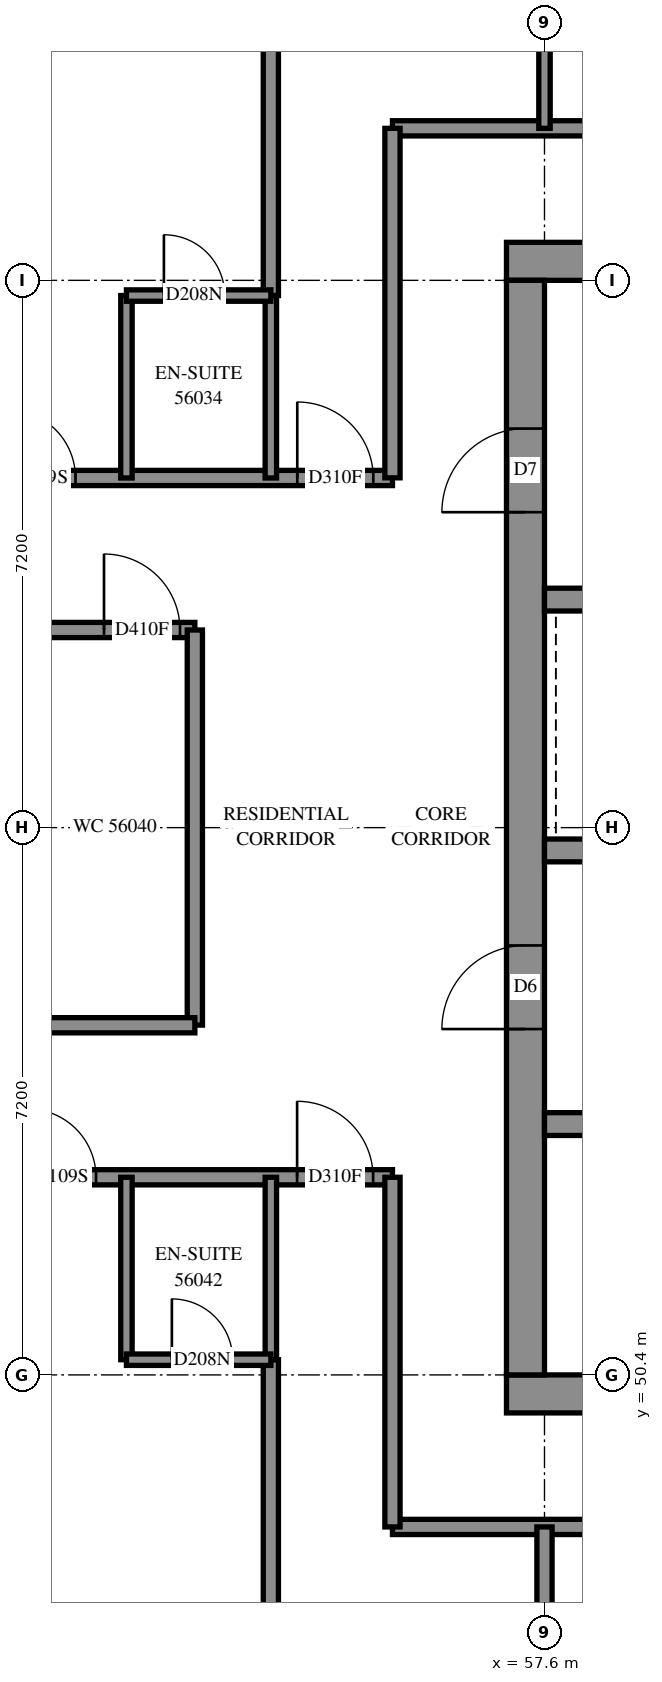
"""IFC4 building model, lengths in metres.
Left out: names, types, materials, properties, quantities, classifications, styles, units other than length and angle.
Written with IfcOpenShell. Run it as: python <this file> out.ifc"""

import sys

from ifc_helpers import new_model, si_unit, direction, frame, frame_2d, origin, place, context, subcontext, project, spatial, rectangle, extrude, element, fill, save


model = new_model("IFC4")
c1 = context("Model", 3, precision=1e-05, world=origin(), true_north=direction((0.0, 1.0)))
c2 = subcontext(c1, "Body", "Model", "MODEL_VIEW")
j1 = project(units=[si_unit("LENGTHUNIT", "METRE"), si_unit("PLANEANGLEUNIT", "RADIAN")], contexts=[c1])
p1 = place(None, origin())
s1 = spatial("IfcSite", under=j1, at=p1, CompositionType="ELEMENT")
p2 = place(p1, origin())
s2 = spatial("IfcBuilding", under=s1, at=p2, CompositionType="ELEMENT")
p3 = place(p2, frame((0.0, 0.0, 206.6)))
s3 = spatial("IfcBuildingStorey", under=s2, at=p3, CompositionType="ELEMENT", Elevation=206.6)
p4 = place(p3, frame((57.1, 50.15, -0.3), z_axis=(0.0, 0.0, 1.0), x_axis=(1.0, 0.0, 0.0)))
e1 = element("IfcWall", 1, at=p4, inside=s3, PredefinedType="SHEAR", context=c2, shape_type="SweptSolid", body=[
    extrude(rectangle(XDim=15.4, YDim=0.5, at=frame_2d((7.7, 0.0))), origin(), (0.0, 0.0, 1.0), 2.7),
])
p5 = place(p3, frame((57.1, 65.05, -0.3), z_axis=(0.0, 0.0, 1.0), x_axis=(1.0, 0.0, 0.0)))
e2 = element("IfcWall", 2, at=p5, inside=s3, PredefinedType="SHEAR", context=c2, shape_type="SweptSolid", body=[
    extrude(rectangle(XDim=15.4, YDim=0.5, at=frame_2d((7.7, 0.0))), origin(), (0.0, 0.0, 1.0), 2.7),
])
p6 = place(p5, frame((10.5, 0.0, 0.3)))
e3 = element("IfcOpeningElement", 3, at=p6, cuts=e2, PredefinedType="OPENING", context=c2, shape_type="SweptSolid", body=[
    extrude(rectangle(XDim=0.8, YDim=2.1, at=frame_2d((0.4, 1.05))), frame((0.0, 0.26, 0.0), z_axis=(0.0, -1.0, 0.0), x_axis=(1.0, 0.0, 0.0)), (0.0, 0.0, 1.0), 0.52),
])
p7 = place(p3, frame((57.35, 50.4, -0.3), z_axis=(0.0, 0.0, 1.0), x_axis=(0.0, 1.0, 0.0)))
e4 = element("IfcWall", 4, at=p7, inside=s3, PredefinedType="SHEAR", context=c2, shape_type="SweptSolid", body=[
    extrude(rectangle(XDim=14.4, YDim=0.5, at=frame_2d((7.2, 0.0))), origin(), (0.0, 0.0, 1.0), 2.7),
])
p8 = place(p7, frame((4.55, 0.0, 0.3)))
e5 = element("IfcOpeningElement", 5, at=p8, cuts=e4, PredefinedType="OPENING", context=c2, shape_type="SweptSolid", body=[
    extrude(rectangle(XDim=1.1, YDim=2.1, at=frame_2d((0.55, 1.05))), frame((0.0, 0.26, 0.0), z_axis=(0.0, -1.0, 0.0), x_axis=(1.0, 0.0, 0.0)), (0.0, 0.0, 1.0), 0.52),
])
p9 = place(p7, frame((11.35, 0.0, 0.3)))
e6 = element("IfcOpeningElement", 6, at=p9, cuts=e4, PredefinedType="OPENING", context=c2, shape_type="SweptSolid", body=[
    extrude(rectangle(XDim=1.1, YDim=2.1, at=frame_2d((0.55, 1.05))), frame((0.0, 0.26, 0.0), z_axis=(0.0, -1.0, 0.0), x_axis=(1.0, 0.0, 0.0)), (0.0, 0.0, 1.0), 0.52),
])
p10 = place(p3, frame((57.6, 53.7, 0.0), z_axis=(0.0, 0.0, 1.0), x_axis=(1.0, 0.0, 0.0)))
e7 = element("IfcWall", 7, at=p10, inside=s3, PredefinedType="SOLIDWALL", context=c2, shape_type="SweptSolid", body=[
    extrude(rectangle(XDim=14.4, YDim=0.3, at=frame_2d((7.2, 0.0))), origin(), (0.0, 0.0, 1.0), 3.1),
])
p11 = place(p10, frame((1.35, 0.0, 0.0)))
e8 = element("IfcOpeningElement", 8, at=p11, cuts=e7, PredefinedType="OPENING", context=c2, shape_type="SweptSolid", body=[
    extrude(rectangle(XDim=0.9, YDim=2.1, at=frame_2d((0.45, 1.05))), frame((0.0, 0.16, 0.0), z_axis=(0.0, -1.0, 0.0), x_axis=(1.0, 0.0, 0.0)), (0.0, 0.0, 1.0), 0.32),
])
p12 = place(p10, frame((4.95, 0.0, 0.0)))
e9 = element("IfcOpeningElement", 9, at=p12, cuts=e7, PredefinedType="OPENING", context=c2, shape_type="SweptSolid", body=[
    extrude(rectangle(XDim=0.9, YDim=2.1, at=frame_2d((0.45, 1.05))), frame((0.0, 0.16, 0.0), z_axis=(0.0, -1.0, 0.0), x_axis=(1.0, 0.0, 0.0)), (0.0, 0.0, 1.0), 0.32),
])
p13 = place(p10, frame((8.55, 0.0, 0.0)))
e10 = element("IfcOpeningElement", 10, at=p13, cuts=e7, PredefinedType="OPENING", context=c2, shape_type="SweptSolid", body=[
    extrude(rectangle(XDim=0.9, YDim=2.1, at=frame_2d((0.45, 1.05))), frame((0.0, 0.16, 0.0), z_axis=(0.0, -1.0, 0.0), x_axis=(1.0, 0.0, 0.0)), (0.0, 0.0, 1.0), 0.32),
])
p14 = place(p10, frame((12.05, 0.0, 0.0)))
e11 = element("IfcOpeningElement", 11, at=p14, cuts=e7, PredefinedType="OPENING", context=c2, shape_type="SweptSolid", body=[
    extrude(rectangle(XDim=1.1, YDim=2.1, at=frame_2d((0.55, 1.05))), frame((0.0, 0.16, 0.0), z_axis=(0.0, -1.0, 0.0), x_axis=(1.0, 0.0, 0.0)), (0.0, 0.0, 1.0), 0.32),
])
p15 = place(p3, frame((57.6, 57.3, 0.0), z_axis=(0.0, 0.0, 1.0), x_axis=(1.0, 0.0, 0.0)))
e12 = element("IfcWall", 12, at=p15, inside=s3, PredefinedType="SOLIDWALL", context=c2, shape_type="SweptSolid", body=[
    extrude(rectangle(XDim=14.4, YDim=0.3, at=frame_2d((7.2, 0.0))), origin(), (0.0, 0.0, 1.0), 3.1),
])
p16 = place(p15, frame((1.25, 0.0, 0.0)))
e13 = element("IfcOpeningElement", 13, at=p16, cuts=e12, PredefinedType="OPENING", context=c2, shape_type="SweptSolid", body=[
    extrude(rectangle(XDim=1.1, YDim=2.1, at=frame_2d((0.55, 1.05))), frame((0.0, 0.16, 0.0), z_axis=(0.0, -1.0, 0.0), x_axis=(1.0, 0.0, 0.0)), (0.0, 0.0, 1.0), 0.32),
])
p17 = place(p15, frame((4.85, 0.0, 0.0)))
e14 = element("IfcOpeningElement", 14, at=p17, cuts=e12, PredefinedType="OPENING", context=c2, shape_type="SweptSolid", body=[
    extrude(rectangle(XDim=1.1, YDim=2.1, at=frame_2d((0.55, 1.05))), frame((0.0, 0.16, 0.0), z_axis=(0.0, -1.0, 0.0), x_axis=(1.0, 0.0, 0.0)), (0.0, 0.0, 1.0), 0.32),
])
p18 = place(p15, frame((8.45, 0.0, 0.0)))
e15 = element("IfcOpeningElement", 15, at=p18, cuts=e12, PredefinedType="OPENING", context=c2, shape_type="SweptSolid", body=[
    extrude(rectangle(XDim=1.1, YDim=2.1, at=frame_2d((0.55, 1.05))), frame((0.0, 0.16, 0.0), z_axis=(0.0, -1.0, 0.0), x_axis=(1.0, 0.0, 0.0)), (0.0, 0.0, 1.0), 0.32),
])
p19 = place(p15, frame((12.05, 0.0, 0.0)))
e16 = element("IfcOpeningElement", 16, at=p19, cuts=e12, PredefinedType="OPENING", context=c2, shape_type="SweptSolid", body=[
    extrude(rectangle(XDim=1.1, YDim=2.1, at=frame_2d((0.55, 1.05))), frame((0.0, 0.16, 0.0), z_axis=(0.0, -1.0, 0.0), x_axis=(1.0, 0.0, 0.0)), (0.0, 0.0, 1.0), 0.32),
])
p20 = place(p3, frame((57.6, 60.6, 0.0), z_axis=(0.0, 0.0, 1.0), x_axis=(1.0, 0.0, 0.0)))
e17 = element("IfcWall", 17, at=p20, inside=s3, PredefinedType="SOLIDWALL", context=c2, shape_type="SweptSolid", body=[
    extrude(rectangle(XDim=7.2, YDim=0.3, at=frame_2d((3.6, 0.0))), origin(), (0.0, 0.0, 1.0), 3.1),
])
p21 = place(p3, frame((55.6, 48.4, 0.0), z_axis=(0.0, 0.0, 1.0), x_axis=(1.0, 0.0, 0.0)))
e18 = element("IfcWall", 18, at=p21, inside=s3, PredefinedType="PARTITIONING", context=c2, shape_type="SweptSolid", body=[
    extrude(rectangle(XDim=18.4, YDim=0.2, at=frame_2d((9.2, 0.0))), origin(), (0.0, 0.0, 1.0), 3.1),
])
p22 = place(p21, frame((5.862, 0.0, 0.0)))
e19 = element("IfcOpeningElement", 19, at=p22, cuts=e18, PredefinedType="OPENING", context=c2, shape_type="SweptSolid", body=[
    extrude(rectangle(XDim=1.0, YDim=2.1, at=frame_2d((0.5, 1.05))), frame((0.0, 0.11, 0.0), z_axis=(0.0, -1.0, 0.0), x_axis=(1.0, 0.0, 0.0)), (0.0, 0.0, 1.0), 0.22),
])
p23 = place(p21, frame((13.099, 0.0, 0.0)))
e20 = element("IfcOpeningElement", 20, at=p23, cuts=e18, PredefinedType="OPENING", context=c2, shape_type="SweptSolid", body=[
    extrude(rectangle(XDim=0.9, YDim=2.1, at=frame_2d((0.45, 1.05))), frame((0.0, 0.11, 0.0), z_axis=(0.0, -1.0, 0.0), x_axis=(1.0, 0.0, 0.0)), (0.0, 0.0, 1.0), 0.22),
])
p24 = place(p3, frame((55.6, 66.8, 0.0), z_axis=(0.0, 0.0, 1.0), x_axis=(1.0, 0.0, 0.0)))
e21 = element("IfcWall", 21, at=p24, inside=s3, PredefinedType="PARTITIONING", context=c2, shape_type="SweptSolid", body=[
    extrude(rectangle(XDim=18.4, YDim=0.2, at=frame_2d((9.2, 0.0))), origin(), (0.0, 0.0, 1.0), 3.1),
])
p25 = place(p24, frame((4.25, 0.0, 0.0)))
e22 = element("IfcOpeningElement", 22, at=p25, cuts=e21, PredefinedType="OPENING", context=c2, shape_type="SweptSolid", body=[
    extrude(rectangle(XDim=0.9, YDim=2.1, at=frame_2d((0.45, 1.05))), frame((0.0, 0.11, 0.0), z_axis=(0.0, -1.0, 0.0), x_axis=(1.0, 0.0, 0.0)), (0.0, 0.0, 1.0), 0.22),
])
p26 = place(p24, frame((7.974, 0.0, 0.0)))
e23 = element("IfcOpeningElement", 23, at=p26, cuts=e21, PredefinedType="OPENING", context=c2, shape_type="SweptSolid", body=[
    extrude(rectangle(XDim=1.0, YDim=2.1, at=frame_2d((0.5, 1.05))), frame((0.0, 0.11, 0.0), z_axis=(0.0, -1.0, 0.0), x_axis=(1.0, 0.0, 0.0)), (0.0, 0.0, 1.0), 0.22),
])
p27 = place(p24, frame((13.2, 0.0, 0.0)))
e24 = element("IfcOpeningElement", 24, at=p27, cuts=e21, PredefinedType="OPENING", context=c2, shape_type="SweptSolid", body=[
    extrude(rectangle(XDim=0.9, YDim=2.1, at=frame_2d((0.45, 1.05))), frame((0.0, 0.11, 0.0), z_axis=(0.0, -1.0, 0.0), x_axis=(1.0, 0.0, 0.0)), (0.0, 0.0, 1.0), 0.22),
])
p28 = place(p3, frame((36.0, 60.2, 0.0), z_axis=(0.0, 0.0, 1.0), x_axis=(1.0, 0.0, 0.0)))
e25 = element("IfcWall", 25, at=p28, inside=s3, PredefinedType="PARTITIONING", context=c2, shape_type="SweptSolid", body=[
    extrude(rectangle(XDim=17.0, YDim=0.2, at=frame_2d((8.5, 0.0))), origin(), (0.0, 0.0, 1.0), 3.1),
])
p29 = place(p28, frame((4.125, 0.0, 0.0)))
e26 = element("IfcOpeningElement", 26, at=p29, cuts=e25, PredefinedType="OPENING", context=c2, shape_type="SweptSolid", body=[
    extrude(rectangle(XDim=1.0, YDim=2.1, at=frame_2d((0.5, 1.05))), frame((0.0, 0.11, 0.0), z_axis=(0.0, -1.0, 0.0), x_axis=(1.0, 0.0, 0.0)), (0.0, 0.0, 1.0), 0.22),
])
p30 = place(p28, frame((7.6, 0.0, 0.0)))
e27 = element("IfcOpeningElement", 27, at=p30, cuts=e25, PredefinedType="OPENING", context=c2, shape_type="SweptSolid", body=[
    extrude(rectangle(XDim=0.9, YDim=2.1, at=frame_2d((0.45, 1.05))), frame((0.0, 0.11, 0.0), z_axis=(0.0, -1.0, 0.0), x_axis=(1.0, 0.0, 0.0)), (0.0, 0.0, 1.0), 0.22),
])
p31 = place(p28, frame((11.48, 0.0, 0.0)))
e28 = element("IfcOpeningElement", 28, at=p31, cuts=e25, PredefinedType="OPENING", context=c2, shape_type="SweptSolid", body=[
    extrude(rectangle(XDim=1.0, YDim=2.1, at=frame_2d((0.5, 1.05))), frame((0.0, 0.11, 0.0), z_axis=(0.0, -1.0, 0.0), x_axis=(1.0, 0.0, 0.0)), (0.0, 0.0, 1.0), 0.22),
])
p32 = place(p28, frame((15.805, 0.0, 0.0)))
e29 = element("IfcOpeningElement", 29, at=p32, cuts=e25, PredefinedType="OPENING", context=c2, shape_type="SweptSolid", body=[
    extrude(rectangle(XDim=1.0, YDim=2.1, at=frame_2d((0.5, 1.05))), frame((0.0, 0.11, 0.0), z_axis=(0.0, -1.0, 0.0), x_axis=(1.0, 0.0, 0.0)), (0.0, 0.0, 1.0), 0.22),
])
p33 = place(p3, frame((40.602, 62.2, 0.0), z_axis=(0.0, 0.0, 1.0), x_axis=(1.0, 0.0, 0.0)))
e30 = element("IfcWall", 30, at=p33, inside=s3, PredefinedType="PARTITIONING", context=c2, shape_type="SweptSolid", body=[
    extrude(rectangle(XDim=14.998, YDim=0.2, at=frame_2d((7.499, 0.0))), origin(), (0.0, 0.0, 1.0), 3.1),
])
p34 = place(p33, frame((6.308, 0.0, 0.0)))
e31 = element("IfcOpeningElement", 31, at=p34, cuts=e30, PredefinedType="OPENING", context=c2, shape_type="SweptSolid", body=[
    extrude(rectangle(XDim=1.0, YDim=2.1, at=frame_2d((0.5, 1.05))), frame((0.0, 0.11, 0.0), z_axis=(0.0, -1.0, 0.0), x_axis=(1.0, 0.0, 0.0)), (0.0, 0.0, 1.0), 0.22),
])
p35 = place(p33, frame((9.928, 0.0, 0.0)))
e32 = element("IfcOpeningElement", 32, at=p35, cuts=e30, PredefinedType="OPENING", context=c2, shape_type="SweptSolid", body=[
    extrude(rectangle(XDim=0.9, YDim=2.1, at=frame_2d((0.45, 1.05))), frame((0.0, 0.11, 0.0), z_axis=(0.0, -1.0, 0.0), x_axis=(1.0, 0.0, 0.0)), (0.0, 0.0, 1.0), 0.22),
])
p36 = place(p33, frame((13.746, 0.0, 0.0)))
e33 = element("IfcOpeningElement", 33, at=p36, cuts=e30, PredefinedType="OPENING", context=c2, shape_type="SweptSolid", body=[
    extrude(rectangle(XDim=1.0, YDim=2.1, at=frame_2d((0.5, 1.05))), frame((0.0, 0.11, 0.0), z_axis=(0.0, -1.0, 0.0), x_axis=(1.0, 0.0, 0.0)), (0.0, 0.0, 1.0), 0.22),
])
p37 = place(p3, frame((54.0, 42.354, 0.0), z_axis=(0.0, 0.0, 1.0), x_axis=(0.0, 1.0, 0.0)))
e34 = element("IfcWall", 34, at=p37, inside=s3, PredefinedType="PARTITIONING", context=c2, shape_type="SweptSolid", body=[
    extrude(rectangle(XDim=8.246, YDim=0.2, at=frame_2d((4.123, 0.0))), origin(), (0.0, 0.0, 1.0), 3.1),
])
p38 = place(p3, frame((54.0, 64.6, 0.0), z_axis=(0.0, 0.0, 1.0), x_axis=(0.0, 1.0, 0.0)))
e35 = element("IfcWall", 35, at=p38, inside=s3, PredefinedType="PARTITIONING", context=c2, shape_type="SweptSolid", body=[
    extrude(rectangle(XDim=8.174, YDim=0.2, at=frame_2d((4.087, 0.0))), origin(), (0.0, 0.0, 1.0), 3.1),
])
p39 = place(p3, frame((50.4, 53.0, 0.0), z_axis=(0.0, 0.0, 1.0), x_axis=(1.0, 0.0, 0.0)))
e36 = element("IfcWall", 36, at=p39, inside=s3, PredefinedType="PARTITIONING", context=c2, shape_type="SweptSolid", body=[
    extrude(rectangle(XDim=5.2, YDim=0.2, at=frame_2d((2.6, 0.0))), origin(), (0.0, 0.0, 1.0), 3.1),
])
p40 = place(p39, frame((0.4, 0.0, 0.0)))
e37 = element("IfcOpeningElement", 37, at=p40, cuts=e36, PredefinedType="OPENING", context=c2, shape_type="SweptSolid", body=[
    extrude(rectangle(XDim=0.9, YDim=2.1, at=frame_2d((0.45, 1.05))), frame((0.0, 0.11, 0.0), z_axis=(0.0, -1.0, 0.0), x_axis=(1.0, 0.0, 0.0)), (0.0, 0.0, 1.0), 0.22),
])
p41 = place(p39, frame((3.946, 0.0, 0.0)))
e38 = element("IfcOpeningElement", 38, at=p41, cuts=e36, PredefinedType="OPENING", context=c2, shape_type="SweptSolid", body=[
    extrude(rectangle(XDim=1.0, YDim=2.1, at=frame_2d((0.5, 1.05))), frame((0.0, 0.11, 0.0), z_axis=(0.0, -1.0, 0.0), x_axis=(1.0, 0.0, 0.0)), (0.0, 0.0, 1.0), 0.22),
])
p42 = place(p3, frame((53.0, 55.002, 0.0), z_axis=(0.0, 0.0, 1.0), x_axis=(0.0, 1.0, 0.0)))
e39 = element("IfcWall", 39, at=p42, inside=s3, PredefinedType="PARTITIONING", context=c2, shape_type="SweptSolid", body=[
    extrude(rectangle(XDim=5.198, YDim=0.2, at=frame_2d((2.599, 0.0))), origin(), (0.0, 0.0, 1.0), 3.1),
])
p43 = place(p3, frame((57.6, 43.6, 0.0), z_axis=(0.0, 0.0, 1.0), x_axis=(0.0, 1.0, 0.0)))
e40 = element("IfcWall", 40, at=p43, inside=s3, PredefinedType="PARTITIONING", context=c2, shape_type="SweptSolid", body=[
    extrude(rectangle(XDim=4.8, YDim=0.2, at=frame_2d((2.4, 0.0))), origin(), (0.0, 0.0, 1.0), 3.1),
])
p44 = place(p3, frame((55.6, 48.4, 0.0), z_axis=(0.0, 0.0, 1.0), x_axis=(0.0, 1.0, 0.0)))
e41 = element("IfcWall", 41, at=p44, inside=s3, PredefinedType="PARTITIONING", context=c2, shape_type="SweptSolid", body=[
    extrude(rectangle(XDim=4.6, YDim=0.2, at=frame_2d((2.3, 0.0))), origin(), (0.0, 0.0, 1.0), 3.1),
])
p45 = place(p3, frame((55.6, 62.202, 0.0), z_axis=(0.0, 0.0, 1.0), x_axis=(0.0, 1.0, 0.0)))
e42 = element("IfcWall", 42, at=p45, inside=s3, PredefinedType="PARTITIONING", context=c2, shape_type="SweptSolid", body=[
    extrude(rectangle(XDim=4.598, YDim=0.2, at=frame_2d((2.299, 0.0))), origin(), (0.0, 0.0, 1.0), 3.1),
])
p46 = place(p3, frame((50.4, 55.0, 0.0), z_axis=(0.0, 0.0, 1.0), x_axis=(1.0, 0.0, 0.0)))
e43 = element("IfcWall", 43, at=p46, inside=s3, PredefinedType="PARTITIONING", context=c2, shape_type="SweptSolid", body=[
    extrude(rectangle(XDim=2.6, YDim=0.2, at=frame_2d((1.3, 0.0))), origin(), (0.0, 0.0, 1.0), 3.1),
])
for number, where, z_axis, x_axis in (
    (44, (57.6, 66.8, 0.0), (0.0, 0.0, 1.0), (0.0, 1.0, 0.0)),
    (45, (52.1, 50.6, 0.0), (0.0, 0.0, 1.0), (0.0, 1.0, 0.0)),
    (46, (54.0, 50.6, 0.0), (0.0, 0.0, 1.0), (0.0, 1.0, 0.0)),
    (47, (52.1, 62.2, 0.0), (0.0, 0.0, 1.0), (0.0, 1.0, 0.0)),
    (48, (54.0, 62.2, 0.0), (0.0, 0.0, 1.0), (0.0, 1.0, 0.0)),
):
    element("IfcWall", number, at=place(p3, frame(where, z_axis=z_axis, x_axis=x_axis)), inside=s3, PredefinedType="PARTITIONING", context=c2, shape_type="SweptSolid", body=[
        extrude(rectangle(XDim=2.4, YDim=0.15, at=frame_2d((1.2, 0.0))), origin(), (0.0, 0.0, 1.0), 3.1),
    ])
p47 = place(p3, frame((52.1, 64.6, 0.0), z_axis=(0.0, 0.0, 1.0), x_axis=(1.0, 0.0, 0.0)))
e49 = element("IfcWall", 49, at=p47, inside=s3, PredefinedType="PARTITIONING", context=c2, shape_type="SweptSolid", body=[
    extrude(rectangle(XDim=1.9, YDim=0.15, at=frame_2d((0.95, 0.0))), origin(), (0.0, 0.0, 1.0), 3.1),
])
p48 = place(p47, frame((0.493, 0.0, 0.0)))
e50 = element("IfcOpeningElement", 50, at=p48, cuts=e49, PredefinedType="OPENING", context=c2, shape_type="SweptSolid", body=[
    extrude(rectangle(XDim=0.8, YDim=2.1, at=frame_2d((0.4, 1.05))), frame((0.0, 0.085, 0.0), z_axis=(0.0, -1.0, 0.0), x_axis=(1.0, 0.0, 0.0)), (0.0, 0.0, 1.0), 0.17),
])
p49 = place(p3, frame((52.1, 50.6, 0.0), z_axis=(0.0, 0.0, 1.0), x_axis=(1.0, 0.0, 0.0)))
e51 = element("IfcWall", 51, at=p49, inside=s3, PredefinedType="PARTITIONING", context=c2, shape_type="SweptSolid", body=[
    extrude(rectangle(XDim=1.9, YDim=0.15, at=frame_2d((0.95, 0.0))), origin(), (0.0, 0.0, 1.0), 3.1),
])
p50 = place(p49, frame((0.598, 0.0, 0.0)))
e52 = element("IfcOpeningElement", 52, at=p50, cuts=e51, PredefinedType="OPENING", context=c2, shape_type="SweptSolid", body=[
    extrude(rectangle(XDim=0.8, YDim=2.1, at=frame_2d((0.4, 1.05))), frame((0.0, 0.085, 0.0), z_axis=(0.0, -1.0, 0.0), x_axis=(1.0, 0.0, 0.0)), (0.0, 0.0, 1.0), 0.17),
])
p51 = place(p8, origin())
e53 = element("IfcDoor", 53, at=p51, inside=s3, OperationType="DOUBLE_DOOR_SINGLE_SWING", PredefinedType="DOOR", context=c2, shape_type="SweptSolid", body=[
    extrude(rectangle(XDim=1.1, YDim=2.1, at=frame_2d((0.55, 1.05))), frame((0.0, 0.025, 0.0), z_axis=(0.0, -1.0, 0.0), x_axis=(1.0, 0.0, 0.0)), (0.0, 0.0, 1.0), 0.05),
])
fill(e5, e53)
p52 = place(p9, origin())
e54 = element("IfcDoor", 54, at=p52, inside=s3, OperationType="SINGLE_SWING_LEFT", PredefinedType="DOOR", context=c2, shape_type="SweptSolid", body=[
    extrude(rectangle(XDim=1.1, YDim=2.1, at=frame_2d((0.55, 1.05))), frame((0.0, 0.025, 0.0), z_axis=(0.0, -1.0, 0.0), x_axis=(1.0, 0.0, 0.0)), (0.0, 0.0, 1.0), 0.05),
])
fill(e6, e54)
p53 = place(p35, origin())
e55 = element("IfcDoor", 55, at=p53, inside=s3, OperationType="SINGLE_SWING_RIGHT", PredefinedType="DOOR", context=c2, shape_type="SweptSolid", body=[
    extrude(rectangle(XDim=0.9, YDim=2.1, at=frame_2d((0.45, 1.05))), frame((0.0, 0.025, 0.0), z_axis=(0.0, -1.0, 0.0), x_axis=(1.0, 0.0, 0.0)), (0.0, 0.0, 1.0), 0.05),
])
fill(e32, e55)
p54 = place(p48, origin())
e56 = element("IfcDoor", 56, at=p54, inside=s3, OperationType="SINGLE_SWING_RIGHT", PredefinedType="DOOR", context=c2, shape_type="SweptSolid", body=[
    extrude(rectangle(XDim=0.8, YDim=2.1, at=frame_2d((0.4, 1.05))), frame((0.0, 0.025, 0.0), z_axis=(0.0, -1.0, 0.0), x_axis=(1.0, 0.0, 0.0)), (0.0, 0.0, 1.0), 0.05),
])
fill(e50, e56)
p55 = place(p36, origin())
e57 = element("IfcDoor", 57, at=p55, inside=s3, OperationType="SINGLE_SWING_LEFT", PredefinedType="DOOR", context=c2, shape_type="SweptSolid", body=[
    extrude(rectangle(XDim=1.0, YDim=2.1, at=frame_2d((0.5, 1.05))), frame((0.0, 0.025, 0.0), z_axis=(0.0, -1.0, 0.0), x_axis=(1.0, 0.0, 0.0)), (0.0, 0.0, 1.0), 0.05),
])
fill(e33, e57)
p56 = place(p32, origin())
e58 = element("IfcDoor", 58, at=p56, inside=s3, OperationType="SINGLE_SWING_LEFT", PredefinedType="DOOR", context=c2, shape_type="SweptSolid", body=[
    extrude(rectangle(XDim=1.0, YDim=2.1, at=frame_2d((0.5, 1.05))), frame((0.0, 0.025, 0.0), z_axis=(0.0, -1.0, 0.0), x_axis=(1.0, 0.0, 0.0)), (0.0, 0.0, 1.0), 0.05),
])
fill(e29, e58)
p57 = place(p40, origin())
e59 = element("IfcDoor", 59, at=p57, inside=s3, OperationType="SINGLE_SWING_LEFT", PredefinedType="DOOR", context=c2, shape_type="SweptSolid", body=[
    extrude(rectangle(XDim=0.9, YDim=2.1, at=frame_2d((0.45, 1.05))), frame((0.0, 0.025, 0.0), z_axis=(0.0, -1.0, 0.0), x_axis=(1.0, 0.0, 0.0)), (0.0, 0.0, 1.0), 0.05),
])
fill(e37, e59)
p58 = place(p50, origin())
e60 = element("IfcDoor", 60, at=p58, inside=s3, OperationType="SINGLE_SWING_RIGHT", PredefinedType="DOOR", context=c2, shape_type="SweptSolid", body=[
    extrude(rectangle(XDim=0.8, YDim=2.1, at=frame_2d((0.4, 1.05))), frame((0.0, 0.025, 0.0), z_axis=(0.0, -1.0, 0.0), x_axis=(1.0, 0.0, 0.0)), (0.0, 0.0, 1.0), 0.05),
])
fill(e52, e60)
p59 = place(p41, origin())
e61 = element("IfcDoor", 61, at=p59, inside=s3, OperationType="SINGLE_SWING_RIGHT", PredefinedType="DOOR", context=c2, shape_type="SweptSolid", body=[
    extrude(rectangle(XDim=1.0, YDim=2.1, at=frame_2d((0.5, 1.05))), frame((0.0, 0.025, 0.0), z_axis=(0.0, -1.0, 0.0), x_axis=(1.0, 0.0, 0.0)), (0.0, 0.0, 1.0), 0.05),
])
fill(e38, e61)
save(model, sys.argv[1])
